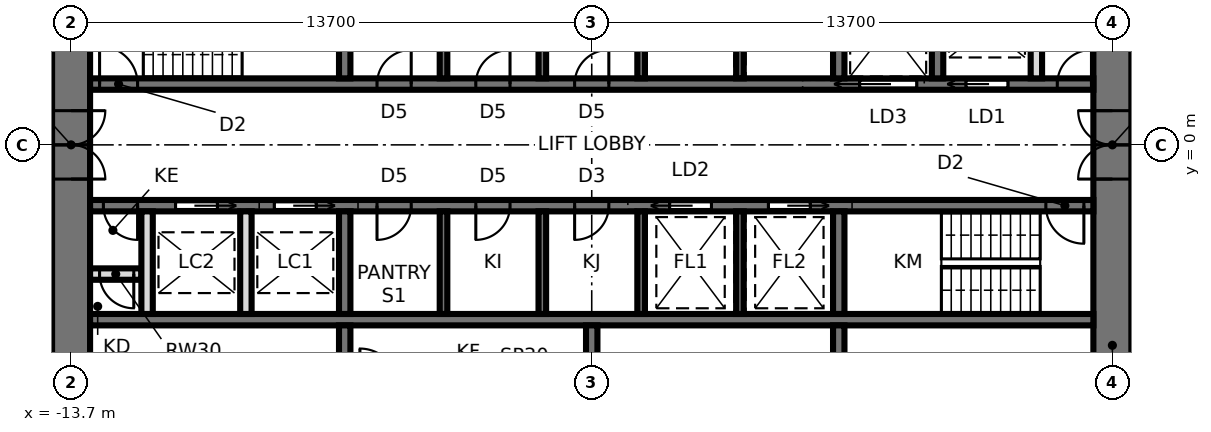
"""IFC4 building model, lengths in metres.
Left out: names, types, materials, properties, quantities, classifications, styles, units other than length and angle.
Written with IfcOpenShell. Run it as: python <this file> out.ifc"""

import sys

from ifc_helpers import new_model, si_unit, direction, frame, frame_2d, origin, place, context, subcontext, project, spatial, rectangle, extrude, element, fill, save


model = new_model("IFC4")
c1 = context("Model", 3, precision=1e-05, world=origin(), true_north=direction((0.0, 1.0)))
c2 = subcontext(c1, "Body", "Model", "MODEL_VIEW")
j1 = project(units=[si_unit("LENGTHUNIT", "METRE"), si_unit("PLANEANGLEUNIT", "RADIAN")], contexts=[c1])
p1 = place(None, origin())
s1 = spatial("IfcSite", under=j1, at=p1, CompositionType="ELEMENT")
p2 = place(p1, origin())
s2 = spatial("IfcBuilding", under=s1, at=p2, CompositionType="ELEMENT")
p3 = place(p2, frame((0.0, 0.0, 176.0)))
s3 = spatial("IfcBuildingStorey", under=s2, at=p3, CompositionType="ELEMENT", Elevation=176.0)
p4 = place(p3, frame((13.7, -9.5, 0.0), z_axis=(0.0, 0.0, 1.0), x_axis=(0.0, 1.0, 0.0)))
e1 = element("IfcWall", 1, at=p4, inside=s3, PredefinedType="SHEAR", context=c2, shape_type="SweptSolid", body=[
    extrude(rectangle(XDim=19.0, YDim=1.0, at=frame_2d((9.5, 0.0))), origin(), (0.0, 0.0, 1.0), 3.9),
])
p5 = place(p4, frame((8.6, 0.0, 0.0)))
e2 = element("IfcOpeningElement", 2, at=p5, cuts=e1, PredefinedType="OPENING", context=c2, shape_type="SweptSolid", body=[
    extrude(rectangle(XDim=1.8, YDim=2.4, at=frame_2d((0.9, 1.2))), frame((0.0, 0.51, 0.0), z_axis=(0.0, -1.0, 0.0), x_axis=(1.0, 0.0, 0.0)), (0.0, 0.0, 1.0), 1.02),
])
p6 = place(p3, frame((-13.7, 9.5, 0.0), z_axis=(0.0, 0.0, 1.0), x_axis=(0.0, -1.0, 0.0)))
e3 = element("IfcWall", 3, at=p6, inside=s3, PredefinedType="SHEAR", context=c2, shape_type="SweptSolid", body=[
    extrude(rectangle(XDim=19.0, YDim=1.0, at=frame_2d((9.5, 0.0))), origin(), (0.0, 0.0, 1.0), 3.9),
])
p7 = place(p6, frame((8.6, 0.0, 0.0)))
e4 = element("IfcOpeningElement", 4, at=p7, cuts=e3, PredefinedType="OPENING", context=c2, shape_type="SweptSolid", body=[
    extrude(rectangle(XDim=1.8, YDim=2.4, at=frame_2d((0.9, 1.2))), frame((0.0, 0.51, 0.0), z_axis=(0.0, -1.0, 0.0), x_axis=(1.0, 0.0, 0.0)), (0.0, 0.0, 1.0), 1.02),
])
p8 = place(p3, frame((-13.2, 1.6, 0.0), z_axis=(0.0, 0.0, 1.0), x_axis=(1.0, 0.0, 0.0)))
e5 = element("IfcWall", 5, at=p8, inside=s3, PredefinedType="SHEAR", context=c2, shape_type="SweptSolid", body=[
    extrude(rectangle(XDim=26.4, YDim=0.3, at=frame_2d((13.2, 0.0))), origin(), (0.0, 0.0, 1.0), 3.9),
])
p9 = place(p8, frame((0.25, 0.0, 0.0)))
e6 = element("IfcOpeningElement", 6, at=p9, cuts=e5, PredefinedType="OPENING", context=c2, shape_type="SweptSolid", body=[
    extrude(rectangle(XDim=1.0, YDim=2.1, at=frame_2d((0.5, 1.05))), frame((0.0, 0.16, 0.0), z_axis=(0.0, -1.0, 0.0), x_axis=(1.0, 0.0, 0.0)), (0.0, 0.0, 1.0), 0.32),
])
p10 = place(p8, frame((23.05, 0.0, 0.0)))
e7 = element("IfcOpeningElement", 7, at=p10, cuts=e5, PredefinedType="OPENING", context=c2, shape_type="SweptSolid", body=[
    extrude(rectangle(XDim=1.1, YDim=2.3, at=frame_2d((0.55, 1.15))), frame((0.0, 0.16, 0.0), z_axis=(0.0, -1.0, 0.0), x_axis=(1.0, 0.0, 0.0)), (0.0, 0.0, 1.0), 0.32),
])
p11 = place(p8, frame((20.25, 0.0, 0.0)))
e8 = element("IfcOpeningElement", 8, at=p11, cuts=e5, PredefinedType="OPENING", context=c2, shape_type="SweptSolid", body=[
    extrude(rectangle(XDim=1.5, YDim=2.4, at=frame_2d((0.75, 1.2))), frame((0.0, 0.16, 0.0), z_axis=(0.0, -1.0, 0.0), x_axis=(1.0, 0.0, 0.0)), (0.0, 0.0, 1.0), 0.32),
])
p12 = place(p8, frame((7.55, 0.0, 0.0)))
e9 = element("IfcOpeningElement", 9, at=p12, cuts=e5, PredefinedType="OPENING", context=c2, shape_type="SweptSolid", body=[
    extrude(rectangle(XDim=0.9, YDim=2.1, at=frame_2d((0.45, 1.05))), frame((0.0, 0.16, 0.0), z_axis=(0.0, -1.0, 0.0), x_axis=(1.0, 0.0, 0.0)), (0.0, 0.0, 1.0), 0.32),
])
p13 = place(p8, frame((10.15, 0.0, 0.0)))
e10 = element("IfcOpeningElement", 10, at=p13, cuts=e5, PredefinedType="OPENING", context=c2, shape_type="SweptSolid", body=[
    extrude(rectangle(XDim=0.9, YDim=2.1, at=frame_2d((0.45, 1.05))), frame((0.0, 0.16, 0.0), z_axis=(0.0, -1.0, 0.0), x_axis=(1.0, 0.0, 0.0)), (0.0, 0.0, 1.0), 0.32),
])
p14 = place(p8, frame((12.75, 0.0, 0.0)))
e11 = element("IfcOpeningElement", 11, at=p14, cuts=e5, PredefinedType="OPENING", context=c2, shape_type="SweptSolid", body=[
    extrude(rectangle(XDim=0.9, YDim=2.1, at=frame_2d((0.45, 1.05))), frame((0.0, 0.16, 0.0), z_axis=(0.0, -1.0, 0.0), x_axis=(1.0, 0.0, 0.0)), (0.0, 0.0, 1.0), 0.32),
])
p15 = place(p8, frame((25.45, 0.0, 0.0)))
e12 = element("IfcOpeningElement", 12, at=p15, cuts=e5, PredefinedType="OPENING", context=c2, shape_type="SweptSolid", body=[
    extrude(rectangle(XDim=0.9, YDim=2.1, at=frame_2d((0.45, 1.05))), frame((0.0, 0.16, 0.0), z_axis=(0.0, -1.0, 0.0), x_axis=(1.0, 0.0, 0.0)), (0.0, 0.0, 1.0), 0.32),
])
p16 = place(p3, frame((-13.2, -1.6, 0.0), z_axis=(0.0, 0.0, 1.0), x_axis=(1.0, 0.0, 0.0)))
e13 = element("IfcWall", 13, at=p16, inside=s3, PredefinedType="SHEAR", context=c2, shape_type="SweptSolid", body=[
    extrude(rectangle(XDim=26.4, YDim=0.3, at=frame_2d((13.2, 0.0))), origin(), (0.0, 0.0, 1.0), 3.9),
])
p17 = place(p16, frame((25.15, 0.0, 0.0)))
e14 = element("IfcOpeningElement", 14, at=p17, cuts=e13, PredefinedType="OPENING", context=c2, shape_type="SweptSolid", body=[
    extrude(rectangle(XDim=1.0, YDim=2.1, at=frame_2d((0.5, 1.05))), frame((0.0, 0.16, 0.0), z_axis=(0.0, -1.0, 0.0), x_axis=(1.0, 0.0, 0.0)), (0.0, 0.0, 1.0), 0.32),
])
p18 = place(p16, frame((7.55, 0.0, 0.0)))
e15 = element("IfcOpeningElement", 15, at=p18, cuts=e13, PredefinedType="OPENING", context=c2, shape_type="SweptSolid", body=[
    extrude(rectangle(XDim=0.9, YDim=2.1, at=frame_2d((0.45, 1.05))), frame((0.0, 0.16, 0.0), z_axis=(0.0, -1.0, 0.0), x_axis=(1.0, 0.0, 0.0)), (0.0, 0.0, 1.0), 0.32),
])
p19 = place(p16, frame((10.15, 0.0, 0.0)))
e16 = element("IfcOpeningElement", 16, at=p19, cuts=e13, PredefinedType="OPENING", context=c2, shape_type="SweptSolid", body=[
    extrude(rectangle(XDim=0.9, YDim=2.1, at=frame_2d((0.45, 1.05))), frame((0.0, 0.16, 0.0), z_axis=(0.0, -1.0, 0.0), x_axis=(1.0, 0.0, 0.0)), (0.0, 0.0, 1.0), 0.32),
])
p20 = place(p16, frame((12.75, 0.0, 0.0)))
e17 = element("IfcOpeningElement", 17, at=p20, cuts=e13, PredefinedType="OPENING", context=c2, shape_type="SweptSolid", body=[
    extrude(rectangle(XDim=0.9, YDim=2.1, at=frame_2d((0.45, 1.05))), frame((0.0, 0.16, 0.0), z_axis=(0.0, -1.0, 0.0), x_axis=(1.0, 0.0, 0.0)), (0.0, 0.0, 1.0), 0.32),
])
p21 = place(p16, frame((15.25, 0.0, 0.0)))
e18 = element("IfcOpeningElement", 18, at=p21, cuts=e13, PredefinedType="OPENING", context=c2, shape_type="SweptSolid", body=[
    extrude(rectangle(XDim=1.1, YDim=2.3, at=frame_2d((0.55, 1.15))), frame((0.0, 0.16, 0.0), z_axis=(0.0, -1.0, 0.0), x_axis=(1.0, 0.0, 0.0)), (0.0, 0.0, 1.0), 0.32),
])
p22 = place(p16, frame((17.85, 0.0, 0.0)))
e19 = element("IfcOpeningElement", 19, at=p22, cuts=e13, PredefinedType="OPENING", context=c2, shape_type="SweptSolid", body=[
    extrude(rectangle(XDim=1.1, YDim=2.3, at=frame_2d((0.55, 1.15))), frame((0.0, 0.16, 0.0), z_axis=(0.0, -1.0, 0.0), x_axis=(1.0, 0.0, 0.0)), (0.0, 0.0, 1.0), 0.32),
])
p23 = place(p16, frame((4.85, 0.0, 0.0)))
e20 = element("IfcOpeningElement", 20, at=p23, cuts=e13, PredefinedType="OPENING", context=c2, shape_type="SweptSolid", body=[
    extrude(rectangle(XDim=1.1, YDim=2.3, at=frame_2d((0.55, 1.15))), frame((0.0, 0.16, 0.0), z_axis=(0.0, -1.0, 0.0), x_axis=(1.0, 0.0, 0.0)), (0.0, 0.0, 1.0), 0.32),
])
p24 = place(p16, frame((2.25, 0.0, 0.0)))
e21 = element("IfcOpeningElement", 21, at=p24, cuts=e13, PredefinedType="OPENING", context=c2, shape_type="SweptSolid", body=[
    extrude(rectangle(XDim=1.1, YDim=2.3, at=frame_2d((0.55, 1.15))), frame((0.0, 0.16, 0.0), z_axis=(0.0, -1.0, 0.0), x_axis=(1.0, 0.0, 0.0)), (0.0, 0.0, 1.0), 0.32),
])
p25 = place(p16, frame((0.35, 0.0, 0.0)))
e22 = element("IfcOpeningElement", 22, at=p25, cuts=e13, PredefinedType="OPENING", context=c2, shape_type="SweptSolid", body=[
    extrude(rectangle(XDim=0.9, YDim=2.1, at=frame_2d((0.45, 1.05))), frame((0.0, 0.16, 0.0), z_axis=(0.0, -1.0, 0.0), x_axis=(1.0, 0.0, 0.0)), (0.0, 0.0, 1.0), 0.32),
])
p26 = place(p3, frame((-13.2, -4.6, 0.0), z_axis=(0.0, 0.0, 1.0), x_axis=(1.0, 0.0, 0.0)))
e23 = element("IfcWall", 23, at=p26, inside=s3, PredefinedType="SHEAR", context=c2, shape_type="SweptSolid", body=[
    extrude(rectangle(XDim=26.4, YDim=0.3, at=frame_2d((13.2, 0.0))), origin(), (0.0, 0.0, 1.0), 3.9),
])
for number, where, z_axis, x_axis in (
    (24, (-6.5, 1.75, 0.0), (0.0, 0.0, 1.0), (0.0, 1.0, 0.0)),
    (25, (6.5, 1.75, 0.0), (0.0, 0.0, 1.0), (0.0, 1.0, 0.0)),
):
    element("IfcWall", number, at=place(p3, frame(where, z_axis=z_axis, x_axis=x_axis)), inside=s3, PredefinedType="SHEAR", context=c2, shape_type="SweptSolid", body=[
        extrude(rectangle(XDim=2.7, YDim=0.3, at=frame_2d((1.35, 0.0))), origin(), (0.0, 0.0, 1.0), 3.9),
    ])
for number, where, z_axis, x_axis in (
    (26, (-3.9, 1.75, 0.0), (0.0, 0.0, 1.0), (0.0, 1.0, 0.0)),
    (27, (-1.3, 1.75, 0.0), (0.0, 0.0, 1.0), (0.0, 1.0, 0.0)),
    (28, (1.3, 1.75, 0.0), (0.0, 0.0, 1.0), (0.0, 1.0, 0.0)),
    (29, (3.9, 1.75, 0.0), (0.0, 0.0, 1.0), (0.0, 1.0, 0.0)),
):
    element("IfcWall", number, at=place(p3, frame(where, z_axis=z_axis, x_axis=x_axis)), inside=s3, PredefinedType="SHEAR", context=c2, shape_type="SweptSolid", body=[
        extrude(rectangle(XDim=2.7, YDim=0.2, at=frame_2d((1.35, 0.0))), origin(), (0.0, 0.0, 1.0), 3.9),
    ])
p27 = place(p3, frame((-6.5, -1.75, 0.0), z_axis=(0.0, 0.0, 1.0), x_axis=(0.0, -1.0, 0.0)))
e30 = element("IfcWall", 30, at=p27, inside=s3, PredefinedType="SHEAR", context=c2, shape_type="SweptSolid", body=[
    extrude(rectangle(XDim=2.7, YDim=0.3, at=frame_2d((1.35, 0.0))), origin(), (0.0, 0.0, 1.0), 3.9),
])
p28 = place(p3, frame((-6.5, -4.75, 0.0), z_axis=(0.0, 0.0, 1.0), x_axis=(0.0, -1.0, 0.0)))
e31 = element("IfcWall", 31, at=p28, inside=s3, PredefinedType="SHEAR", context=c2, shape_type="SweptSolid", body=[
    extrude(rectangle(XDim=3.75, YDim=0.3, at=frame_2d((1.875, 0.0))), origin(), (0.0, 0.0, 1.0), 3.9),
])
p29 = place(p3, frame((6.5, -1.75, 0.0), z_axis=(0.0, 0.0, 1.0), x_axis=(0.0, -1.0, 0.0)))
e32 = element("IfcWall", 32, at=p29, inside=s3, PredefinedType="SHEAR", context=c2, shape_type="SweptSolid", body=[
    extrude(rectangle(XDim=2.7, YDim=0.3, at=frame_2d((1.35, 0.0))), origin(), (0.0, 0.0, 1.0), 3.9),
])
p30 = place(p3, frame((6.5, -4.75, 0.0), z_axis=(0.0, 0.0, 1.0), x_axis=(0.0, -1.0, 0.0)))
e33 = element("IfcWall", 33, at=p30, inside=s3, PredefinedType="SHEAR", context=c2, shape_type="SweptSolid", body=[
    extrude(rectangle(XDim=3.75, YDim=0.3, at=frame_2d((1.875, 0.0))), origin(), (0.0, 0.0, 1.0), 3.9),
])
for number, where, z_axis, x_axis in (
    (34, (-3.9, -1.75, 0.0), (0.0, 0.0, 1.0), (0.0, -1.0, 0.0)),
    (35, (-1.3, -1.75, 0.0), (0.0, 0.0, 1.0), (0.0, -1.0, 0.0)),
    (36, (1.3, -1.75, 0.0), (0.0, 0.0, 1.0), (0.0, -1.0, 0.0)),
    (37, (3.9, -1.75, 0.0), (0.0, 0.0, 1.0), (0.0, -1.0, 0.0)),
):
    element("IfcWall", number, at=place(p3, frame(where, z_axis=z_axis, x_axis=x_axis)), inside=s3, PredefinedType="SHEAR", context=c2, shape_type="SweptSolid", body=[
        extrude(rectangle(XDim=2.7, YDim=0.2, at=frame_2d((1.35, 0.0))), origin(), (0.0, 0.0, 1.0), 3.9),
    ])
p31 = place(p3, frame((0.0, -4.75, 0.0), z_axis=(0.0, 0.0, 1.0), x_axis=(0.0, -1.0, 0.0)))
e38 = element("IfcWall", 38, at=p31, inside=s3, PredefinedType="SHEAR", context=c2, shape_type="SweptSolid", body=[
    extrude(rectangle(XDim=3.75, YDim=0.3, at=frame_2d((1.875, 0.0))), origin(), (0.0, 0.0, 1.0), 3.9),
])
p32 = place(p3, frame((9.1, 1.75, 0.0), z_axis=(0.0, 0.0, 1.0), x_axis=(0.0, 1.0, 0.0)))
e39 = element("IfcWall", 39, at=p32, inside=s3, PredefinedType="SHEAR", context=c2, shape_type="SweptSolid", body=[
    extrude(rectangle(XDim=2.7, YDim=0.3, at=frame_2d((1.35, 0.0))), origin(), (0.0, 0.0, 1.0), 3.9),
])
p33 = place(p3, frame((-13.2, -3.4, 0.0), z_axis=(0.0, 0.0, 1.0), x_axis=(1.0, 0.0, 0.0)))
e40 = element("IfcWall", 40, at=p33, inside=s3, PredefinedType="SOLIDWALL", context=c2, shape_type="SweptSolid", body=[
    extrude(rectangle(XDim=1.35, YDim=0.3, at=frame_2d((0.675, 0.0))), origin(), (0.0, 0.0, 1.0), 3.74),
])
p34 = place(p33, frame((0.25, 0.0, 0.0)))
e41 = element("IfcOpeningElement", 41, at=p34, cuts=e40, PredefinedType="OPENING", context=c2, shape_type="SweptSolid", body=[
    extrude(rectangle(XDim=0.9, YDim=2.1, at=frame_2d((0.45, 1.05))), frame((0.0, 0.16, 0.0), z_axis=(0.0, -1.0, 0.0), x_axis=(1.0, 0.0, 0.0)), (0.0, 0.0, 1.0), 0.32),
])
for number, where, z_axis, x_axis in (
    (42, (-9.1, -1.75, 0.0), (0.0, 0.0, 1.0), (0.0, -1.0, 0.0)),
    (43, (-11.7, -1.75, 0.0), (0.0, 0.0, 1.0), (0.0, -1.0, 0.0)),
    (44, (11.7, 1.75, 0.0), (0.0, 0.0, 1.0), (0.0, 1.0, 0.0)),
):
    element("IfcWall", number, at=place(p3, frame(where, z_axis=z_axis, x_axis=x_axis)), inside=s3, PredefinedType="SOLIDWALL", context=c2, shape_type="SweptSolid", body=[
        extrude(rectangle(XDim=2.7, YDim=0.3, at=frame_2d((1.35, 0.0))), origin(), (0.0, 0.0, 1.0), 3.74),
    ])
p35 = place(p7, origin())
e45 = element("IfcDoor", 45, at=p35, inside=s3, OperationType="DOUBLE_DOOR_SINGLE_SWING", PredefinedType="DOOR", context=c2, shape_type="SweptSolid", body=[
    extrude(rectangle(XDim=1.72, YDim=2.36, at=frame_2d((0.9, 1.18))), frame((0.0, 0.025, 0.0), z_axis=(0.0, -1.0, 0.0), x_axis=(1.0, 0.0, 0.0)), (0.0, 0.0, 1.0), 0.05),
    extrude(rectangle(XDim=0.04, YDim=2.4, at=frame_2d((0.02, 1.2))), frame((0.0, 0.25, 0.0), z_axis=(0.0, -1.0, 0.0), x_axis=(1.0, 0.0, 0.0)), (0.0, 0.0, 1.0), 0.5),
    extrude(rectangle(XDim=0.04, YDim=2.4, at=frame_2d((1.78, 1.2))), frame((0.0, 0.25, 0.0), z_axis=(0.0, -1.0, 0.0), x_axis=(1.0, 0.0, 0.0)), (0.0, 0.0, 1.0), 0.5),
    extrude(rectangle(XDim=1.72, YDim=0.04, at=frame_2d((0.9, 2.38))), frame((0.0, 0.25, 0.0), z_axis=(0.0, -1.0, 0.0), x_axis=(1.0, 0.0, 0.0)), (0.0, 0.0, 1.0), 0.5),
])
fill(e4, e45)
p36 = place(p5, origin())
e46 = element("IfcDoor", 46, at=p36, inside=s3, OperationType="DOUBLE_DOOR_SINGLE_SWING", PredefinedType="DOOR", context=c2, shape_type="SweptSolid", body=[
    extrude(rectangle(XDim=1.72, YDim=2.36, at=frame_2d((0.9, 1.18))), frame((0.0, 0.025, 0.0), z_axis=(0.0, -1.0, 0.0), x_axis=(1.0, 0.0, 0.0)), (0.0, 0.0, 1.0), 0.05),
    extrude(rectangle(XDim=0.04, YDim=2.4, at=frame_2d((0.02, 1.2))), frame((0.0, 0.25, 0.0), z_axis=(0.0, -1.0, 0.0), x_axis=(1.0, 0.0, 0.0)), (0.0, 0.0, 1.0), 0.5),
    extrude(rectangle(XDim=0.04, YDim=2.4, at=frame_2d((1.78, 1.2))), frame((0.0, 0.25, 0.0), z_axis=(0.0, -1.0, 0.0), x_axis=(1.0, 0.0, 0.0)), (0.0, 0.0, 1.0), 0.5),
    extrude(rectangle(XDim=1.72, YDim=0.04, at=frame_2d((0.9, 2.38))), frame((0.0, 0.25, 0.0), z_axis=(0.0, -1.0, 0.0), x_axis=(1.0, 0.0, 0.0)), (0.0, 0.0, 1.0), 0.5),
])
fill(e2, e46)
p37 = place(p9, origin())
e47 = element("IfcDoor", 47, at=p37, inside=s3, OperationType="SINGLE_SWING_LEFT", PredefinedType="DOOR", context=c2, shape_type="SweptSolid", body=[
    extrude(rectangle(XDim=1.0, YDim=2.1, at=frame_2d((0.5, 1.05))), frame((0.0, 0.025, 0.0), z_axis=(0.0, -1.0, 0.0), x_axis=(1.0, 0.0, 0.0)), (0.0, 0.0, 1.0), 0.05),
])
fill(e6, e47)
p38 = place(p17, frame((1.0, 0.0, 0.0), z_axis=(0.0, 0.0, 1.0), x_axis=(-1.0, 0.0, 0.0)))
e48 = element("IfcDoor", 48, at=p38, inside=s3, OperationType="SINGLE_SWING_LEFT", PredefinedType="DOOR", context=c2, shape_type="SweptSolid", body=[
    extrude(rectangle(XDim=1.0, YDim=2.1, at=frame_2d((0.5, 1.05))), frame((0.0, 0.025, 0.0), z_axis=(0.0, -1.0, 0.0), x_axis=(1.0, 0.0, 0.0)), (0.0, 0.0, 1.0), 0.05),
])
fill(e14, e48)
p39 = place(p10, origin())
e49 = element("IfcDoor", 49, at=p39, inside=s3, OperationType="SLIDING_TO_LEFT", PredefinedType="DOOR", context=c2, shape_type="SweptSolid", body=[
    extrude(rectangle(XDim=1.1, YDim=2.3, at=frame_2d((0.55, 1.15))), frame((0.0, 0.025, 0.0), z_axis=(0.0, -1.0, 0.0), x_axis=(1.0, 0.0, 0.0)), (0.0, 0.0, 1.0), 0.05),
])
fill(e7, e49)
p40 = place(p11, origin())
e50 = element("IfcDoor", 50, at=p40, inside=s3, OperationType="SLIDING_TO_LEFT", PredefinedType="DOOR", context=c2, shape_type="SweptSolid", body=[
    extrude(rectangle(XDim=1.5, YDim=2.4, at=frame_2d((0.75, 1.2))), frame((0.0, 0.025, 0.0), z_axis=(0.0, -1.0, 0.0), x_axis=(1.0, 0.0, 0.0)), (0.0, 0.0, 1.0), 0.05),
])
fill(e8, e50)
p41 = place(p12, origin())
e51 = element("IfcDoor", 51, at=p41, inside=s3, OperationType="SINGLE_SWING_RIGHT", PredefinedType="DOOR", context=c2, shape_type="SweptSolid", body=[
    extrude(rectangle(XDim=0.9, YDim=2.1, at=frame_2d((0.45, 1.05))), frame((0.0, 0.025, 0.0), z_axis=(0.0, -1.0, 0.0), x_axis=(1.0, 0.0, 0.0)), (0.0, 0.0, 1.0), 0.05),
])
fill(e9, e51)
p42 = place(p13, origin())
e52 = element("IfcDoor", 52, at=p42, inside=s3, OperationType="SINGLE_SWING_RIGHT", PredefinedType="DOOR", context=c2, shape_type="SweptSolid", body=[
    extrude(rectangle(XDim=0.9, YDim=2.1, at=frame_2d((0.45, 1.05))), frame((0.0, 0.025, 0.0), z_axis=(0.0, -1.0, 0.0), x_axis=(1.0, 0.0, 0.0)), (0.0, 0.0, 1.0), 0.05),
])
fill(e10, e52)
p43 = place(p14, origin())
e53 = element("IfcDoor", 53, at=p43, inside=s3, OperationType="SINGLE_SWING_RIGHT", PredefinedType="DOOR", context=c2, shape_type="SweptSolid", body=[
    extrude(rectangle(XDim=0.9, YDim=2.1, at=frame_2d((0.45, 1.05))), frame((0.0, 0.025, 0.0), z_axis=(0.0, -1.0, 0.0), x_axis=(1.0, 0.0, 0.0)), (0.0, 0.0, 1.0), 0.05),
])
fill(e11, e53)
p44 = place(p18, frame((0.9, 0.0, 0.0), z_axis=(0.0, 0.0, 1.0), x_axis=(-1.0, 0.0, 0.0)))
e54 = element("IfcDoor", 54, at=p44, inside=s3, OperationType="SINGLE_SWING_RIGHT", PredefinedType="DOOR", context=c2, shape_type="SweptSolid", body=[
    extrude(rectangle(XDim=0.9, YDim=2.1, at=frame_2d((0.45, 1.05))), frame((0.0, 0.025, 0.0), z_axis=(0.0, -1.0, 0.0), x_axis=(1.0, 0.0, 0.0)), (0.0, 0.0, 1.0), 0.05),
])
fill(e15, e54)
p45 = place(p19, frame((0.9, 0.0, 0.0), z_axis=(0.0, 0.0, 1.0), x_axis=(-1.0, 0.0, 0.0)))
e55 = element("IfcDoor", 55, at=p45, inside=s3, OperationType="SINGLE_SWING_RIGHT", PredefinedType="DOOR", context=c2, shape_type="SweptSolid", body=[
    extrude(rectangle(XDim=0.9, YDim=2.1, at=frame_2d((0.45, 1.05))), frame((0.0, 0.025, 0.0), z_axis=(0.0, -1.0, 0.0), x_axis=(1.0, 0.0, 0.0)), (0.0, 0.0, 1.0), 0.05),
])
fill(e16, e55)
p46 = place(p20, frame((0.9, 0.0, 0.0), z_axis=(0.0, 0.0, 1.0), x_axis=(-1.0, 0.0, 0.0)))
e56 = element("IfcDoor", 56, at=p46, inside=s3, OperationType="SINGLE_SWING_RIGHT", PredefinedType="DOOR", context=c2, shape_type="SweptSolid", body=[
    extrude(rectangle(XDim=0.9, YDim=2.1, at=frame_2d((0.45, 1.05))), frame((0.0, 0.025, 0.0), z_axis=(0.0, -1.0, 0.0), x_axis=(1.0, 0.0, 0.0)), (0.0, 0.0, 1.0), 0.05),
])
fill(e17, e56)
p47 = place(p21, frame((1.1, 0.0, 0.0), z_axis=(0.0, 0.0, 1.0), x_axis=(-1.0, 0.0, 0.0)))
e57 = element("IfcDoor", 57, at=p47, inside=s3, OperationType="SLIDING_TO_RIGHT", PredefinedType="DOOR", context=c2, shape_type="SweptSolid", body=[
    extrude(rectangle(XDim=1.1, YDim=2.3, at=frame_2d((0.55, 1.15))), frame((0.0, 0.025, 0.0), z_axis=(0.0, -1.0, 0.0), x_axis=(1.0, 0.0, 0.0)), (0.0, 0.0, 1.0), 0.05),
])
fill(e18, e57)
p48 = place(p22, frame((1.1, 0.0, 0.0), z_axis=(0.0, 0.0, 1.0), x_axis=(-1.0, 0.0, 0.0)))
e58 = element("IfcDoor", 58, at=p48, inside=s3, OperationType="SLIDING_TO_LEFT", PredefinedType="DOOR", context=c2, shape_type="SweptSolid", body=[
    extrude(rectangle(XDim=1.1, YDim=2.3, at=frame_2d((0.55, 1.15))), frame((0.0, 0.025, 0.0), z_axis=(0.0, -1.0, 0.0), x_axis=(1.0, 0.0, 0.0)), (0.0, 0.0, 1.0), 0.05),
])
fill(e19, e58)
p49 = place(p23, frame((1.1, 0.0, 0.0), z_axis=(0.0, 0.0, 1.0), x_axis=(-1.0, 0.0, 0.0)))
e59 = element("IfcDoor", 59, at=p49, inside=s3, OperationType="SLIDING_TO_LEFT", PredefinedType="DOOR", context=c2, shape_type="SweptSolid", body=[
    extrude(rectangle(XDim=1.1, YDim=2.3, at=frame_2d((0.55, 1.15))), frame((0.0, 0.025, 0.0), z_axis=(0.0, -1.0, 0.0), x_axis=(1.0, 0.0, 0.0)), (0.0, 0.0, 1.0), 0.05),
])
fill(e20, e59)
p50 = place(p24, frame((1.1, 0.0, 0.0), z_axis=(0.0, 0.0, 1.0), x_axis=(-1.0, 0.0, 0.0)))
e60 = element("IfcDoor", 60, at=p50, inside=s3, OperationType="SLIDING_TO_LEFT", PredefinedType="DOOR", context=c2, shape_type="SweptSolid", body=[
    extrude(rectangle(XDim=1.1, YDim=2.3, at=frame_2d((0.55, 1.15))), frame((0.0, 0.025, 0.0), z_axis=(0.0, -1.0, 0.0), x_axis=(1.0, 0.0, 0.0)), (0.0, 0.0, 1.0), 0.05),
])
fill(e21, e60)
p51 = place(p15, origin())
e61 = element("IfcDoor", 61, at=p51, inside=s3, OperationType="SINGLE_SWING_RIGHT", PredefinedType="DOOR", context=c2, shape_type="SweptSolid", body=[
    extrude(rectangle(XDim=0.9, YDim=2.1, at=frame_2d((0.45, 1.05))), frame((0.0, 0.025, 0.0), z_axis=(0.0, -1.0, 0.0), x_axis=(1.0, 0.0, 0.0)), (0.0, 0.0, 1.0), 0.05),
])
fill(e12, e61)
p52 = place(p25, frame((0.9, 0.0, 0.0), z_axis=(0.0, 0.0, 1.0), x_axis=(-1.0, 0.0, 0.0)))
e62 = element("IfcDoor", 62, at=p52, inside=s3, OperationType="SINGLE_SWING_LEFT", PredefinedType="DOOR", context=c2, shape_type="SweptSolid", body=[
    extrude(rectangle(XDim=0.9, YDim=2.1, at=frame_2d((0.45, 1.05))), frame((0.0, 0.025, 0.0), z_axis=(0.0, -1.0, 0.0), x_axis=(1.0, 0.0, 0.0)), (0.0, 0.0, 1.0), 0.05),
])
fill(e22, e62)
p53 = place(p34, frame((0.9, 0.0, 0.0), z_axis=(0.0, 0.0, 1.0), x_axis=(-1.0, 0.0, 0.0)))
e63 = element("IfcDoor", 63, at=p53, inside=s3, OperationType="SINGLE_SWING_LEFT", PredefinedType="DOOR", context=c2, shape_type="SweptSolid", body=[
    extrude(rectangle(XDim=0.9, YDim=2.1, at=frame_2d((0.45, 1.05))), frame((0.0, 0.025, 0.0), z_axis=(0.0, -1.0, 0.0), x_axis=(1.0, 0.0, 0.0)), (0.0, 0.0, 1.0), 0.05),
])
fill(e41, e63)
save(model, sys.argv[1])
